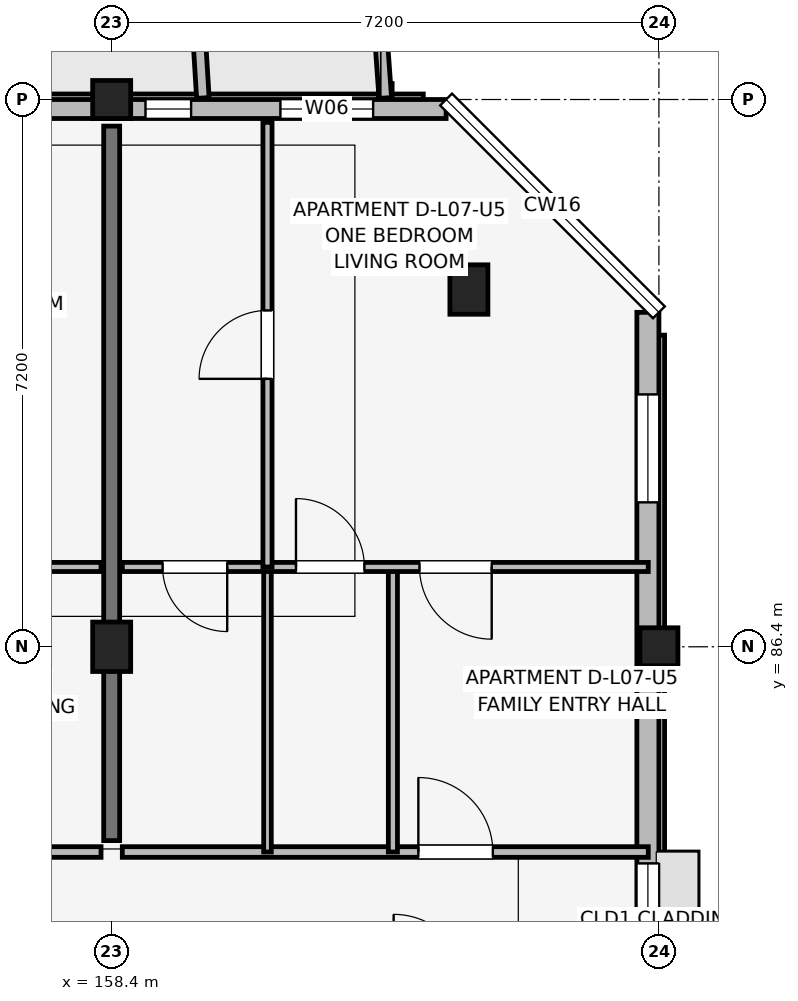
"""IFC4 building model, lengths in metres.
Left out: names, types, materials, properties, quantities, classifications, styles, units other than length and angle.
Written with IfcOpenShell. Run it as: python <this file> out.ifc"""

import sys

from ifc_helpers import new_model, si_unit, direction, frame, frame_2d, origin, origin_2d, place, context, subcontext, project, spatial, rectangle, extrude, element, fill, save


model = new_model("IFC4")
c1 = context("Model", 3, precision=1e-05, world=origin(), true_north=direction((0.0, 1.0)))
c2 = subcontext(c1, "Body", "Model", "MODEL_VIEW")
j1 = project(units=[si_unit("LENGTHUNIT", "METRE"), si_unit("PLANEANGLEUNIT", "RADIAN")], contexts=[c1])
p1 = place(None, origin())
s1 = spatial("IfcSite", under=j1, at=p1, CompositionType="ELEMENT")
p2 = place(p1, origin())
s2 = spatial("IfcBuilding", under=s1, at=p2, CompositionType="ELEMENT")
p3 = place(p2, frame((0.0, 0.0, 24.45)))
s3 = spatial("IfcBuildingStorey", under=s2, at=p3, CompositionType="ELEMENT", Elevation=24.45)
p4 = place(p3, frame((158.4, 86.4, 0.0), z_axis=(0.0, 0.0, 1.0), x_axis=(1.0, 0.0, 0.0)))
e1 = element("IfcColumn", 1, at=p4, inside=s3, PredefinedType="COLUMN", context=c2, shape_type="SweptSolid", body=[
    extrude(rectangle(XDim=0.5, YDim=0.65, at=origin_2d()), origin(), (0.0, 0.0, 1.0), 3.15),
])
for number, where, z_axis, x_axis in (
    (2, (158.4, 93.6, 0.0), (0.0, 0.0, 1.0), (1.0, 0.0, 0.0)),
    (3, (165.6, 86.4, 0.0), (0.0, 0.0, 1.0), (1.0, 0.0, 0.0)),
):
    element("IfcColumn", number, at=place(p3, frame(where, z_axis=z_axis, x_axis=x_axis)), inside=s3, PredefinedType="COLUMN", context=c2, shape_type="SweptSolid", body=[
        extrude(rectangle(XDim=0.5, YDim=0.5, at=origin_2d()), origin(), (0.0, 0.0, 1.0), 3.15),
    ])
p5 = place(p3, frame((163.1, 91.1, 0.0), z_axis=(0.0, 0.0, 1.0), x_axis=(1.0, 0.0, 0.0)))
e4 = element("IfcColumn", 4, at=p5, inside=s3, PredefinedType="COLUMN", context=c2, shape_type="SweptSolid", body=[
    extrude(rectangle(XDim=0.5, YDim=0.65, at=origin_2d()), origin(), (0.0, 0.0, 1.0), 3.15),
])
p6 = place(p3, frame((158.4, 83.85, 0.0), z_axis=(0.0, 0.0, 1.0), x_axis=(0.0, 1.0, 0.0)))
e5 = element("IfcWall", 5, at=p6, inside=s3, PredefinedType="SHEAR", context=c2, shape_type="SweptSolid", body=[
    extrude(rectangle(XDim=9.4, YDim=0.21, at=frame_2d((4.7, 0.0))), origin(), (0.0, 0.0, 1.0), 3.15),
])
p7 = place(p3, frame((165.455, 74.8, 0.0), z_axis=(0.0, 0.0, 1.0), x_axis=(0.0, 1.0, 0.0)))
e6 = element("IfcWall", 6, at=p7, inside=s3, PredefinedType="SOLIDWALL", context=c2, shape_type="SweptSolid", body=[
    extrude(rectangle(XDim=16.0, YDim=0.29, at=frame_2d((8.0, 0.0))), origin(), (0.0, 0.0, 1.0), 2.43),
])
p8 = place(p7, frame((7.25, 0.0, 1.05)))
e7 = element("IfcOpeningElement", 7, at=p8, cuts=e6, PredefinedType="OPENING", context=c2, shape_type="SweptSolid", body=[
    extrude(rectangle(XDim=1.5, YDim=1.15, at=frame_2d((0.75, 0.575))), frame((0.0, 0.155, 0.0), z_axis=(0.0, -1.0, 0.0), x_axis=(1.0, 0.0, 0.0)), (0.0, 0.0, 1.0), 0.31),
])
p9 = place(p7, frame((13.5, 0.0, 0.72)))
e8 = element("IfcOpeningElement", 8, at=p9, cuts=e6, PredefinedType="OPENING", context=c2, shape_type="SweptSolid", body=[
    extrude(rectangle(XDim=1.42, YDim=1.6, at=frame_2d((0.71, 0.8))), frame((0.0, 0.155, 0.0), z_axis=(0.0, -1.0, 0.0), x_axis=(1.0, 0.0, 0.0)), (0.0, 0.0, 1.0), 0.31),
])
p10 = place(p3, frame((162.8, 93.475, 0.0), z_axis=(0.0, 0.0, 1.0), x_axis=(-1.0, 0.0, 0.0)))
e9 = element("IfcWall", 9, at=p10, inside=s3, PredefinedType="SOLIDWALL", context=c2, shape_type="SweptSolid", body=[
    extrude(rectangle(XDim=30.4, YDim=0.25, at=frame_2d((15.2, 0.0))), origin(), (0.0, 0.0, 1.0), 2.43),
])
p11 = place(p10, frame((21.95, 0.0, 0.0), z_axis=(0.0, 0.0, 1.0), x_axis=(-1.0, 0.0, 0.0)))
e10 = element("IfcOpeningElement", 10, at=p11, cuts=e9, PredefinedType="OPENING", context=c2, shape_type="SweptSolid", body=[
    extrude(rectangle(XDim=1.5, YDim=2.15, at=frame_2d((0.75, 1.075))), frame((0.0, 0.135, 0.0), z_axis=(0.0, -1.0, 0.0), x_axis=(1.0, 0.0, 0.0)), (0.0, 0.0, 1.0), 0.27),
])
p12 = place(p10, frame((7.7, 0.0, 0.0), z_axis=(0.0, 0.0, 1.0), x_axis=(-1.0, 0.0, 0.0)))
e11 = element("IfcOpeningElement", 11, at=p12, cuts=e9, PredefinedType="OPENING", context=c2, shape_type="SweptSolid", body=[
    extrude(rectangle(XDim=1.8, YDim=2.15, at=frame_2d((0.9, 1.075))), frame((0.0, 0.135, 0.0), z_axis=(0.0, -1.0, 0.0), x_axis=(1.0, 0.0, 0.0)), (0.0, 0.0, 1.0), 0.27),
])
p13 = place(p10, frame((27.97, 0.0, 0.7)))
e12 = element("IfcOpeningElement", 12, at=p13, cuts=e9, PredefinedType="OPENING", context=c2, shape_type="SweptSolid", body=[
    extrude(rectangle(XDim=1.46, YDim=1.55, at=frame_2d((0.73, 0.775))), frame((0.0, 0.135, 0.0), z_axis=(0.0, -1.0, 0.0), x_axis=(1.0, 0.0, 0.0)), (0.0, 0.0, 1.0), 0.27),
])
p14 = place(p10, frame((26.445, 0.0, 0.75)))
e13 = element("IfcOpeningElement", 13, at=p14, cuts=e9, PredefinedType="OPENING", context=c2, shape_type="SweptSolid", body=[
    extrude(rectangle(XDim=0.6, YDim=1.25, at=frame_2d((0.3, 0.625))), frame((0.0, 0.135, 0.0), z_axis=(0.0, -1.0, 0.0), x_axis=(1.0, 0.0, 0.0)), (0.0, 0.0, 1.0), 0.27),
])
p15 = place(p10, frame((23.925, 0.0, 0.75)))
e14 = element("IfcOpeningElement", 14, at=p15, cuts=e9, PredefinedType="OPENING", context=c2, shape_type="SweptSolid", body=[
    extrude(rectangle(XDim=0.72, YDim=1.35, at=frame_2d((0.36, 0.675))), frame((0.0, 0.135, 0.0), z_axis=(0.0, -1.0, 0.0), x_axis=(1.0, 0.0, 0.0)), (0.0, 0.0, 1.0), 0.27),
])
p16 = place(p10, frame((16.725, 0.0, 0.75)))
e15 = element("IfcOpeningElement", 15, at=p16, cuts=e9, PredefinedType="OPENING", context=c2, shape_type="SweptSolid", body=[
    extrude(rectangle(XDim=0.72, YDim=1.35, at=frame_2d((0.36, 0.675))), frame((0.0, 0.135, 0.0), z_axis=(0.0, -1.0, 0.0), x_axis=(1.0, 0.0, 0.0)), (0.0, 0.0, 1.0), 0.27),
])
p17 = place(p10, frame((12.925, 0.0, 0.67)))
e16 = element("IfcOpeningElement", 16, at=p17, cuts=e9, PredefinedType="OPENING", context=c2, shape_type="SweptSolid", body=[
    extrude(rectangle(XDim=2.15, YDim=1.65, at=frame_2d((1.075, 0.825))), frame((0.0, 0.135, 0.0), z_axis=(0.0, -1.0, 0.0), x_axis=(1.0, 0.0, 0.0)), (0.0, 0.0, 1.0), 0.27),
])
p18 = place(p10, frame((3.355, 0.0, 0.75)))
e17 = element("IfcOpeningElement", 17, at=p18, cuts=e9, PredefinedType="OPENING", context=c2, shape_type="SweptSolid", body=[
    extrude(rectangle(XDim=0.6, YDim=1.25, at=frame_2d((0.3, 0.625))), frame((0.0, 0.135, 0.0), z_axis=(0.0, -1.0, 0.0), x_axis=(1.0, 0.0, 0.0)), (0.0, 0.0, 1.0), 0.27),
])
p19 = place(p10, frame((0.96, 0.0, 0.75)))
e18 = element("IfcOpeningElement", 18, at=p19, cuts=e9, PredefinedType="OPENING", context=c2, shape_type="SweptSolid", body=[
    extrude(rectangle(XDim=1.22, YDim=1.5, at=frame_2d((0.61, 0.75))), frame((0.0, 0.135, 0.0), z_axis=(0.0, -1.0, 0.0), x_axis=(1.0, 0.0, 0.0)), (0.0, 0.0, 1.0), 0.27),
])
p20 = place(p3, frame((159.6, 93.62, 0.0), z_axis=(0.0, 0.0, 1.0), x_axis=(-0.061170732449, 0.998127317276, 0.0)))
e19 = element("IfcWall", 19, at=p20, inside=s3, PredefinedType="ELEMENTEDWALL", context=c2, shape_type="SweptSolid", body=[
    extrude(rectangle(XDim=1.964, YDim=0.165, at=frame_2d((0.982, 0.0))), origin(), (0.0, 0.0, 1.0), 2.95),
])
p21 = place(p3, frame((162.0, 93.62, 0.0), z_axis=(0.0, 0.0, 1.0), x_axis=(-0.071194071069, 0.997462482625, 0.0)))
e20 = element("IfcWall", 20, at=p21, inside=s3, PredefinedType="ELEMENTEDWALL", context=c2, shape_type="SweptSolid", body=[
    extrude(rectangle(XDim=1.965, YDim=0.165, at=frame_2d((0.982, 0.0))), origin(), (0.0, 0.0, 1.0), 2.95),
])
p22 = place(p3, frame((151.34, 83.7, 0.0), z_axis=(0.0, 0.0, 1.0), x_axis=(1.0, 0.0, 0.0)))
e21 = element("IfcWall", 21, at=p22, inside=s3, PredefinedType="PARTITIONING", context=c2, shape_type="SweptSolid", body=[
    extrude(rectangle(XDim=6.92, YDim=0.14, at=frame_2d((3.46, 0.0))), origin(), (0.0, 0.0, 1.0), 2.38),
])
p23 = place(p22, frame((4.995, 0.0, 0.0)))
e22 = element("IfcOpeningElement", 22, at=p23, cuts=e21, PredefinedType="OPENING", context=c2, shape_type="SweptSolid", body=[
    extrude(rectangle(XDim=0.98, YDim=2.1, at=frame_2d((0.49, 1.05))), frame((0.0, 0.08, 0.0), z_axis=(0.0, -1.0, 0.0), x_axis=(1.0, 0.0, 0.0)), (0.0, 0.0, 1.0), 0.16),
])
p24 = place(p3, frame((151.34, 87.45, 0.0), z_axis=(0.0, 0.0, 1.0), x_axis=(1.0, 0.0, 0.0)))
e23 = element("IfcWall", 23, at=p24, inside=s3, PredefinedType="PARTITIONING", context=c2, shape_type="SweptSolid", body=[
    extrude(rectangle(XDim=6.92, YDim=0.12, at=frame_2d((3.46, 0.0))), origin(), (0.0, 0.0, 1.0), 2.38),
])
p25 = place(p24, frame((1.475, 0.0, 0.0), z_axis=(0.0, 0.0, 1.0), x_axis=(-1.0, 0.0, 0.0)))
e24 = element("IfcOpeningElement", 24, at=p25, cuts=e23, PredefinedType="OPENING", context=c2, shape_type="SweptSolid", body=[
    extrude(rectangle(XDim=0.85, YDim=2.08, at=frame_2d((0.425, 1.04))), frame((0.0, 0.07, 0.0), z_axis=(0.0, -1.0, 0.0), x_axis=(1.0, 0.0, 0.0)), (0.0, 0.0, 1.0), 0.14),
])
p26 = place(p24, frame((2.625, 0.0, 0.0)))
e25 = element("IfcOpeningElement", 25, at=p26, cuts=e23, PredefinedType="OPENING", context=c2, shape_type="SweptSolid", body=[
    extrude(rectangle(XDim=0.9, YDim=2.08, at=frame_2d((0.45, 1.04))), frame((0.0, 0.07, 0.0), z_axis=(0.0, -1.0, 0.0), x_axis=(1.0, 0.0, 0.0)), (0.0, 0.0, 1.0), 0.14),
])
p27 = place(p24, frame((5.96, 0.0, 0.0), z_axis=(0.0, 0.0, 1.0), x_axis=(-1.0, 0.0, 0.0)))
e26 = element("IfcOpeningElement", 26, at=p27, cuts=e23, PredefinedType="OPENING", context=c2, shape_type="SweptSolid", body=[
    extrude(rectangle(XDim=0.95, YDim=2.08, at=frame_2d((0.475, 1.04))), frame((0.0, 0.07, 0.0), z_axis=(0.0, -1.0, 0.0), x_axis=(1.0, 0.0, 0.0)), (0.0, 0.0, 1.0), 0.14),
])
p28 = place(p3, frame((158.54, 83.7, 0.0), z_axis=(0.0, 0.0, 1.0), x_axis=(1.0, 0.0, 0.0)))
e27 = element("IfcWall", 27, at=p28, inside=s3, PredefinedType="PARTITIONING", context=c2, shape_type="SweptSolid", body=[
    extrude(rectangle(XDim=6.92, YDim=0.14, at=frame_2d((3.46, 0.0))), origin(), (0.0, 0.0, 1.0), 2.38),
])
p29 = place(p28, frame((3.895, 0.0, 0.0)))
e28 = element("IfcOpeningElement", 28, at=p29, cuts=e27, PredefinedType="OPENING", context=c2, shape_type="SweptSolid", body=[
    extrude(rectangle(XDim=0.98, YDim=2.1, at=frame_2d((0.49, 1.05))), frame((0.0, 0.08, 0.0), z_axis=(0.0, -1.0, 0.0), x_axis=(1.0, 0.0, 0.0)), (0.0, 0.0, 1.0), 0.16),
])
p30 = place(p3, frame((160.45, 83.7, 0.0), z_axis=(0.0, 0.0, 1.0), x_axis=(0.0, 1.0, 0.0)))
e29 = element("IfcWall", 29, at=p30, inside=s3, PredefinedType="PARTITIONING", context=c2, shape_type="SweptSolid", body=[
    extrude(rectangle(XDim=3.75, YDim=0.1, at=frame_2d((1.875, 0.0))), origin(), (0.0, 0.0, 1.0), 2.38),
])
p31 = place(p3, frame((162.1, 83.7, 0.0), z_axis=(0.0, 0.0, 1.0), x_axis=(0.0, 1.0, 0.0)))
e30 = element("IfcWall", 30, at=p31, inside=s3, PredefinedType="PARTITIONING", context=c2, shape_type="SweptSolid", body=[
    extrude(rectangle(XDim=3.75, YDim=0.12, at=frame_2d((1.875, 0.0))), origin(), (0.0, 0.0, 1.0), 2.38),
])
p32 = place(p3, frame((158.54, 87.45, 0.0), z_axis=(0.0, 0.0, 1.0), x_axis=(1.0, 0.0, 0.0)))
e31 = element("IfcWall", 31, at=p32, inside=s3, PredefinedType="PARTITIONING", context=c2, shape_type="SweptSolid", body=[
    extrude(rectangle(XDim=6.92, YDim=0.12, at=frame_2d((3.46, 0.0))), origin(), (0.0, 0.0, 1.0), 2.38),
])
p33 = place(p32, frame((1.38, 0.0, 0.0), z_axis=(0.0, 0.0, 1.0), x_axis=(-1.0, 0.0, 0.0)))
e32 = element("IfcOpeningElement", 32, at=p33, cuts=e31, PredefinedType="OPENING", context=c2, shape_type="SweptSolid", body=[
    extrude(rectangle(XDim=0.85, YDim=2.08, at=frame_2d((0.425, 1.04))), frame((0.0, 0.07, 0.0), z_axis=(0.0, -1.0, 0.0), x_axis=(1.0, 0.0, 0.0)), (0.0, 0.0, 1.0), 0.14),
])
p34 = place(p32, frame((2.285, 0.0, 0.0)))
e33 = element("IfcOpeningElement", 33, at=p34, cuts=e31, PredefinedType="OPENING", context=c2, shape_type="SweptSolid", body=[
    extrude(rectangle(XDim=0.9, YDim=2.08, at=frame_2d((0.45, 1.04))), frame((0.0, 0.07, 0.0), z_axis=(0.0, -1.0, 0.0), x_axis=(1.0, 0.0, 0.0)), (0.0, 0.0, 1.0), 0.14),
])
p35 = place(p32, frame((4.86, 0.0, 0.0), z_axis=(0.0, 0.0, 1.0), x_axis=(-1.0, 0.0, 0.0)))
e34 = element("IfcOpeningElement", 34, at=p35, cuts=e31, PredefinedType="OPENING", context=c2, shape_type="SweptSolid", body=[
    extrude(rectangle(XDim=0.95, YDim=2.08, at=frame_2d((0.475, 1.04))), frame((0.0, 0.07, 0.0), z_axis=(0.0, -1.0, 0.0), x_axis=(1.0, 0.0, 0.0)), (0.0, 0.0, 1.0), 0.14),
])
p36 = place(p3, frame((160.45, 87.45, 0.0), z_axis=(0.0, 0.0, 1.0), x_axis=(0.0, 1.0, 0.0)))
e35 = element("IfcWall", 35, at=p36, inside=s3, PredefinedType="PARTITIONING", context=c2, shape_type="SweptSolid", body=[
    extrude(rectangle(XDim=5.85, YDim=0.12, at=frame_2d((2.925, 0.0))), origin(), (0.0, 0.0, 1.0), 2.38),
])
p37 = place(p36, frame((2.475, 0.0, 0.0)))
e36 = element("IfcOpeningElement", 36, at=p37, cuts=e35, PredefinedType="OPENING", context=c2, shape_type="SweptSolid", body=[
    extrude(rectangle(XDim=0.9, YDim=2.08, at=frame_2d((0.45, 1.04))), frame((0.0, 0.07, 0.0), z_axis=(0.0, -1.0, 0.0), x_axis=(1.0, 0.0, 0.0)), (0.0, 0.0, 1.0), 0.14),
])
p38 = place(p18, origin())
e37 = element("IfcWindow", 37, at=p38, inside=s3, PartitioningType="SINGLE_PANEL", PredefinedType="WINDOW", context=c2, shape_type="SweptSolid", body=[
    extrude(rectangle(XDim=0.6, YDim=1.25, at=frame_2d((0.3, 0.625))), frame((0.0, 0.03, 0.0), z_axis=(0.0, -1.0, 0.0), x_axis=(1.0, 0.0, 0.0)), (0.0, 0.0, 1.0), 0.06),
])
fill(e17, e37)
p39 = place(p19, origin())
e38 = element("IfcWindow", 38, at=p39, inside=s3, PartitioningType="SINGLE_PANEL", PredefinedType="WINDOW", context=c2, shape_type="SweptSolid", body=[
    extrude(rectangle(XDim=1.22, YDim=1.5, at=frame_2d((0.61, 0.75))), frame((0.0, 0.03, 0.0), z_axis=(0.0, -1.0, 0.0), x_axis=(1.0, 0.0, 0.0)), (0.0, 0.0, 1.0), 0.06),
])
fill(e18, e38)
p40 = place(p8, origin())
e39 = element("IfcWindow", 39, at=p40, inside=s3, PartitioningType="SINGLE_PANEL", PredefinedType="WINDOW", context=c2, shape_type="SweptSolid", body=[
    extrude(rectangle(XDim=1.5, YDim=1.15, at=frame_2d((0.75, 0.575))), frame((0.0, 0.03, 0.0), z_axis=(0.0, -1.0, 0.0), x_axis=(1.0, 0.0, 0.0)), (0.0, 0.0, 1.0), 0.06),
])
fill(e7, e39)
p41 = place(p9, origin())
e40 = element("IfcWindow", 40, at=p41, inside=s3, PartitioningType="SINGLE_PANEL", PredefinedType="WINDOW", context=c2, shape_type="SweptSolid", body=[
    extrude(rectangle(XDim=1.42, YDim=1.6, at=frame_2d((0.71, 0.8))), frame((0.0, 0.03, 0.0), z_axis=(0.0, -1.0, 0.0), x_axis=(1.0, 0.0, 0.0)), (0.0, 0.0, 1.0), 0.06),
])
fill(e8, e40)
p42 = place(p29, origin())
e41 = element("IfcDoor", 41, at=p42, inside=s3, OperationType="SINGLE_SWING_LEFT", PredefinedType="DOOR", context=c2, shape_type="SweptSolid", body=[
    extrude(rectangle(XDim=0.98, YDim=2.1, at=frame_2d((0.49, 1.05))), frame((0.0, 0.025, 0.0), z_axis=(0.0, -1.0, 0.0), x_axis=(1.0, 0.0, 0.0)), (0.0, 0.0, 1.0), 0.05),
])
fill(e28, e41)
p43 = place(p33, origin())
e42 = element("IfcDoor", 42, at=p43, inside=s3, OperationType="SINGLE_SWING_RIGHT", PredefinedType="DOOR", context=c2, shape_type="SweptSolid", body=[
    extrude(rectangle(XDim=0.85, YDim=2.08, at=frame_2d((0.425, 1.04))), frame((0.0, 0.025, 0.0), z_axis=(0.0, -1.0, 0.0), x_axis=(1.0, 0.0, 0.0)), (0.0, 0.0, 1.0), 0.05),
])
fill(e32, e42)
p44 = place(p34, origin())
e43 = element("IfcDoor", 43, at=p44, inside=s3, OperationType="SINGLE_SWING_LEFT", PredefinedType="DOOR", context=c2, shape_type="SweptSolid", body=[
    extrude(rectangle(XDim=0.9, YDim=2.08, at=frame_2d((0.45, 1.04))), frame((0.0, 0.025, 0.0), z_axis=(0.0, -1.0, 0.0), x_axis=(1.0, 0.0, 0.0)), (0.0, 0.0, 1.0), 0.05),
])
fill(e33, e43)
p45 = place(p35, origin())
e44 = element("IfcDoor", 44, at=p45, inside=s3, OperationType="SINGLE_SWING_RIGHT", PredefinedType="DOOR", context=c2, shape_type="SweptSolid", body=[
    extrude(rectangle(XDim=0.95, YDim=2.08, at=frame_2d((0.475, 1.04))), frame((0.0, 0.025, 0.0), z_axis=(0.0, -1.0, 0.0), x_axis=(1.0, 0.0, 0.0)), (0.0, 0.0, 1.0), 0.05),
])
fill(e34, e44)
p46 = place(p37, origin())
e45 = element("IfcDoor", 45, at=p46, inside=s3, OperationType="SINGLE_SWING_LEFT", PredefinedType="DOOR", context=c2, shape_type="SweptSolid", body=[
    extrude(rectangle(XDim=0.9, YDim=2.08, at=frame_2d((0.45, 1.04))), frame((0.0, 0.025, 0.0), z_axis=(0.0, -1.0, 0.0), x_axis=(1.0, 0.0, 0.0)), (0.0, 0.0, 1.0), 0.05),
])
fill(e36, e45)
save(model, sys.argv[1])
